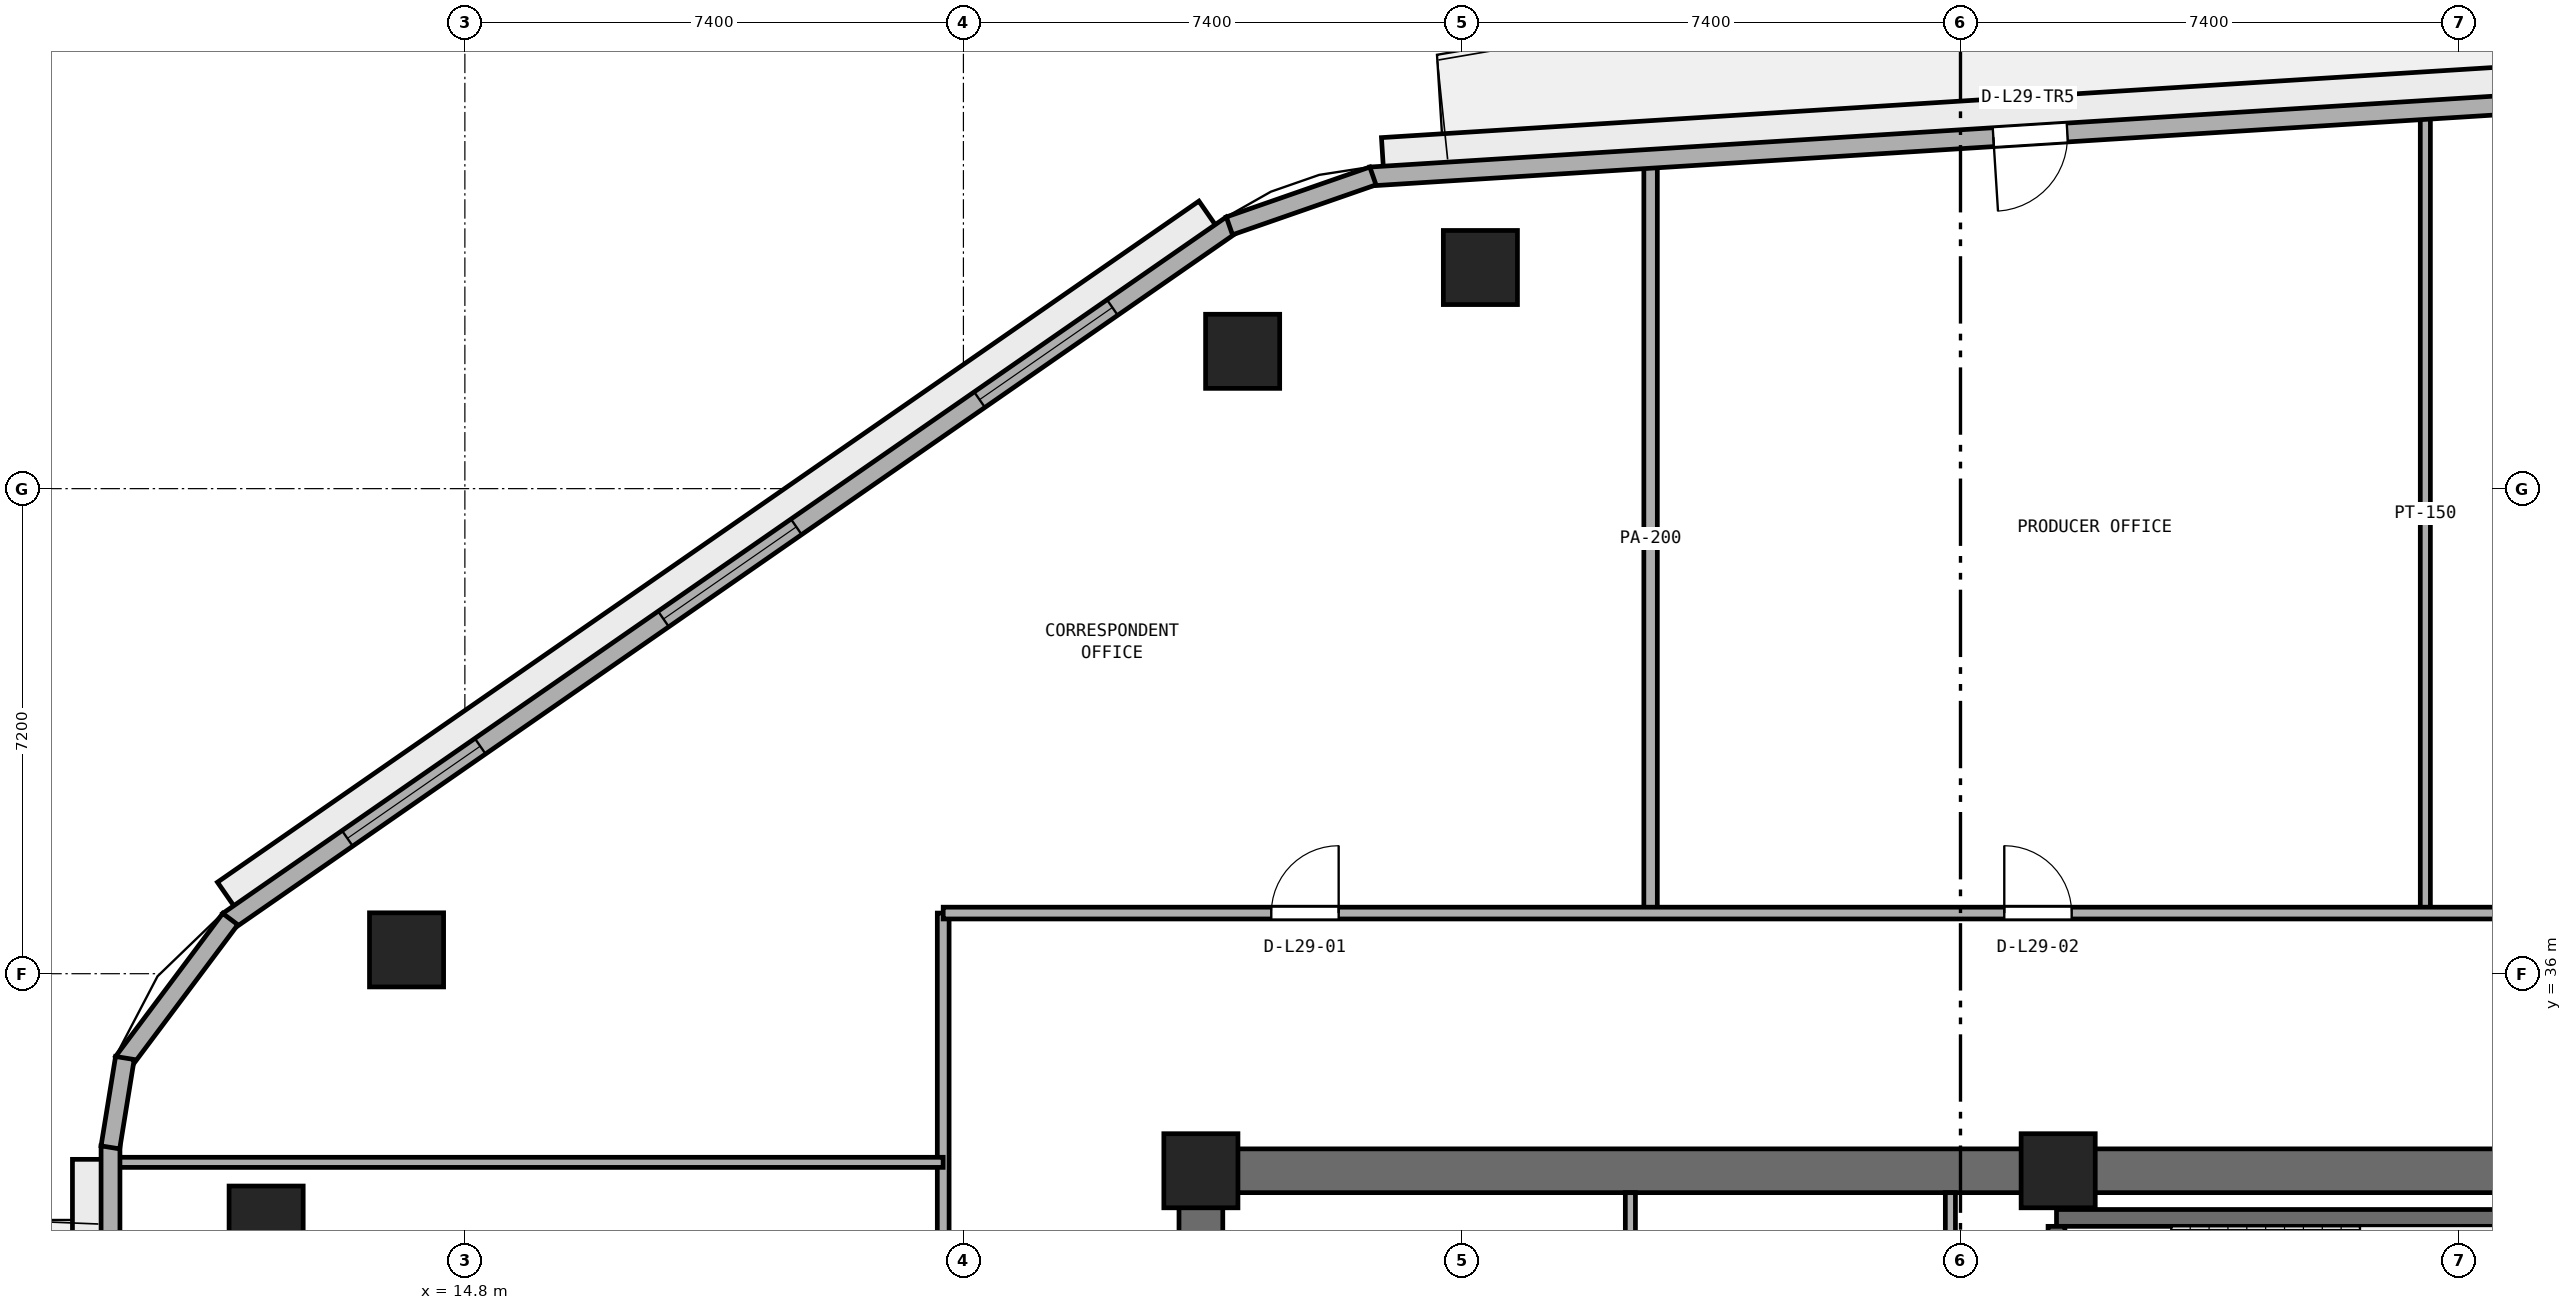
"""IFC4 building model, lengths in metres.
Left out: names, types, materials, properties, quantities, classifications, styles, units other than length and angle.
Written with IfcOpenShell. Run it as: python <this file> out.ifc"""

import sys

from ifc_helpers import new_model, si_unit, direction, frame, frame_2d, origin, origin_2d, place, context, subcontext, project, spatial, rectangle, extrude, element, fill, save


model = new_model("IFC4")
c1 = context("Model", 3, precision=1e-05, world=origin(), true_north=direction((0.0, 1.0)))
c2 = subcontext(c1, "Body", "Model", "MODEL_VIEW")
j1 = project(units=[si_unit("LENGTHUNIT", "METRE"), si_unit("PLANEANGLEUNIT", "RADIAN")], contexts=[c1])
p1 = place(None, origin())
s1 = spatial("IfcSite", under=j1, at=p1, CompositionType="ELEMENT")
p2 = place(p1, origin())
s2 = spatial("IfcBuilding", under=s1, at=p2, CompositionType="ELEMENT")
p3 = place(p2, frame((0.0, 0.0, 116.2)))
s3 = spatial("IfcBuildingStorey", under=s2, at=p3, CompositionType="ELEMENT", Elevation=116.2)
p4 = place(p3, frame((25.4, 33.075, 0.0), z_axis=(0.0, 0.0, 1.0), x_axis=(1.0, 0.0, 0.0)))
e1 = element("IfcWall", 1, at=p4, inside=s3, PredefinedType="SHEAR", context=c2, shape_type="SweptSolid", body=[
    extrude(rectangle(XDim=23.2, YDim=0.65, at=frame_2d((11.6, 0.0))), origin(), (0.0, 0.0, 1.0), 3.4),
])
p5 = place(p3, frame((25.725, 17.65, 0.0), z_axis=(0.0, 0.0, 1.0), x_axis=(0.0, 1.0, 0.0)))
e2 = element("IfcWall", 2, at=p5, inside=s3, PredefinedType="SHEAR", context=c2, shape_type="SweptSolid", body=[
    extrude(rectangle(XDim=15.1, YDim=0.65, at=frame_2d((7.55, 0.0))), origin(), (0.0, 0.0, 1.0), 3.4),
])
p6 = place(p5, frame((6.8, 0.0, 0.0)))
e3 = element("IfcOpeningElement", 3, at=p6, cuts=e2, PredefinedType="OPENING", context=c2, shape_type="SweptSolid", body=[
    extrude(rectangle(XDim=1.5, YDim=2.15, at=frame_2d((0.75, 1.075))), frame((0.0, 0.335, 0.0), z_axis=(0.0, -1.0, 0.0), x_axis=(1.0, 0.0, 0.0)), (0.0, 0.0, 1.0), 0.67),
])
for number, where, z_axis, x_axis in (
    (4, (38.45, 33.075, 0.0), (0.0, 0.0, 1.0), (1.0, 0.0, 0.0)),
    (5, (25.725, 33.075, 0.0), (0.0, 0.0, 1.0), (1.0, 0.0, 0.0)),
):
    element("IfcColumn", number, at=place(p3, frame(where, z_axis=z_axis, x_axis=x_axis)), inside=s3, PredefinedType="PILASTER", context=c2, shape_type="SweptSolid", body=[
        extrude(rectangle(XDim=1.1, YDim=1.1, at=origin_2d()), origin(), (0.0, 0.0, 1.0), 3.8),
    ])
for number, where, z_axis, x_axis in (
    (6, (29.874, 46.482, 0.0), (0.0, 0.0, 1.0), (1.0, 0.0, 0.0)),
    (7, (26.344, 45.238, 0.0), (0.0, 0.0, 1.0), (1.0, 0.0, 0.0)),
    (8, (13.934, 36.354, 0.0), (0.0, 0.0, 1.0), (1.0, 0.0, 0.0)),
    (9, (11.85, 32.298, 0.0), (0.0, 0.0, 1.0), (1.0, 0.0, 0.0)),
):
    element("IfcColumn", number, at=place(p3, frame(where, z_axis=z_axis, x_axis=x_axis)), inside=s3, PredefinedType="COLUMN", context=c2, shape_type="SweptSolid", body=[
        extrude(rectangle(XDim=1.1, YDim=1.1, at=origin_2d()), origin(), (0.0, 0.0, 1.0), 3.8),
    ])
p7 = place(p3, frame((38.425, 32.375, 0.0), z_axis=(0.0, 0.0, 1.0), x_axis=(1.0, 0.0, 0.0)))
e10 = element("IfcWall", 10, at=p7, inside=s3, PredefinedType="SHEAR", context=c2, shape_type="SweptSolid", body=[
    extrude(rectangle(XDim=7.3, YDim=0.25, at=frame_2d((3.65, 0.0))), origin(), (0.0, 0.0, 1.0), 3.4),
])
p8 = place(p3, frame((38.425, 29.05, 0.0), z_axis=(0.0, 0.0, 1.0), x_axis=(0.0, 1.0, 0.0)))
e11 = element("IfcWall", 11, at=p8, inside=s3, PredefinedType="SHEAR", context=c2, shape_type="SweptSolid", body=[
    extrude(rectangle(XDim=3.2, YDim=0.25, at=frame_2d((1.6, 0.0))), origin(), (0.0, 0.0, 1.0), 3.4),
])
p9 = place(p8, frame((0.35, 0.0, 0.0)))
e12 = element("IfcOpeningElement", 12, at=p9, cuts=e11, PredefinedType="OPENING", context=c2, shape_type="SweptSolid", body=[
    extrude(rectangle(XDim=1.1, YDim=2.15, at=frame_2d((0.55, 1.075))), frame((0.0, 0.135, 0.0), z_axis=(0.0, -1.0, 0.0), x_axis=(1.0, 0.0, 0.0)), (0.0, 0.0, 1.0), 0.27),
])
for number, where, z_axis, x_axis in (
    (13, (32.1, 30.65, 0.0), (0.0, 0.0, 1.0), (0.0, 1.0, 0.0)),
    (14, (36.85, 30.65, 0.0), (0.0, 0.0, 1.0), (0.0, 1.0, 0.0)),
):
    element("IfcWall", number, at=place(p3, frame(where, z_axis=z_axis, x_axis=x_axis)), inside=s3, PredefinedType="PARTITIONING", context=c2, shape_type="SweptSolid", body=[
        extrude(rectangle(XDim=2.1, YDim=0.15, at=frame_2d((1.05, 0.0))), origin(), (0.0, 0.0, 1.0), 3.4),
    ])
p10 = place(p3, frame((43.9, 36.9, 0.0), z_axis=(0.0, 0.0, 1.0), x_axis=(0.0, 1.0, 0.0)))
e15 = element("IfcWall", 15, at=p10, inside=s3, PredefinedType="PARTITIONING", context=c2, shape_type="SweptSolid", body=[
    extrude(rectangle(XDim=11.857, YDim=0.15, at=frame_2d((5.928, 0.0))), origin(), (0.0, 0.0, 1.0), 3.4),
])
p11 = place(p3, frame((32.4, 36.901, 0.0), z_axis=(0.0, 0.0, 1.0), x_axis=(0.0, 1.0, 0.0)))
e16 = element("IfcWall", 16, at=p11, inside=s3, PredefinedType="PARTITIONING", context=c2, shape_type="SweptSolid", body=[
    extrude(rectangle(XDim=11.131, YDim=0.2, at=frame_2d((5.565, 0.0))), origin(), (0.0, 0.0, 1.0), 3.4),
])
p12 = place(p3, frame((21.9, 5.958, 0.0), z_axis=(0.0, 0.0, 1.0), x_axis=(0.0, 1.0, 0.0)))
e17 = element("IfcWall", 17, at=p12, inside=s3, PredefinedType="PARTITIONING", context=c2, shape_type="SweptSolid", body=[
    extrude(rectangle(XDim=30.942, YDim=0.175, at=frame_2d((15.471, 0.0))), origin(), (0.0, 0.0, 1.0), 3.4),
])
p13 = place(p12, frame((10.292, 0.0, 0.0)))
e18 = element("IfcOpeningElement", 18, at=p13, cuts=e17, PredefinedType="OPENING", context=c2, shape_type="SweptSolid", body=[
    extrude(rectangle(XDim=1.0, YDim=2.12, at=frame_2d((0.5, 1.06))), frame((0.0, 0.097, 0.0), z_axis=(0.0, -1.0, 0.0), x_axis=(1.0, 0.0, 0.0)), (0.0, 0.0, 1.0), 0.195),
])
p14 = place(p12, frame((16.842, 0.0, 0.0)))
e19 = element("IfcOpeningElement", 19, at=p14, cuts=e17, PredefinedType="OPENING", context=c2, shape_type="SweptSolid", body=[
    extrude(rectangle(XDim=1.0, YDim=2.12, at=frame_2d((0.5, 1.06))), frame((0.0, 0.097, 0.0), z_axis=(0.0, -1.0, 0.0), x_axis=(1.0, 0.0, 0.0)), (0.0, 0.0, 1.0), 0.195),
])
p15 = place(p12, frame((23.492, 0.0, 0.0)))
e20 = element("IfcOpeningElement", 20, at=p15, cuts=e17, PredefinedType="OPENING", context=c2, shape_type="SweptSolid", body=[
    extrude(rectangle(XDim=0.9, YDim=2.1, at=frame_2d((0.45, 1.05))), frame((0.0, 0.097, 0.0), z_axis=(0.0, -1.0, 0.0), x_axis=(1.0, 0.0, 0.0)), (0.0, 0.0, 1.0), 0.195),
])
p16 = place(p3, frame((9.605, 33.2, 0.0), z_axis=(0.0, 0.0, 1.0), x_axis=(1.0, 0.0, 0.0)))
e21 = element("IfcWall", 21, at=p16, inside=s3, PredefinedType="PARTITIONING", context=c2, shape_type="SweptSolid", body=[
    extrude(rectangle(XDim=12.294, YDim=0.15, at=frame_2d((6.147, 0.0))), origin(), (0.0, 0.0, 1.0), 3.4),
])
p17 = place(p3, frame((21.9, 36.9, 0.0), z_axis=(0.0, 0.0, 1.0), x_axis=(1.0, 0.0, 0.0)))
e22 = element("IfcWall", 22, at=p17, inside=s3, PredefinedType="PARTITIONING", context=c2, shape_type="SweptSolid", body=[
    extrude(rectangle(XDim=30.2, YDim=0.175, at=frame_2d((15.1, 0.0))), origin(), (0.0, 0.0, 1.0), 3.4),
])
p18 = place(p17, frame((4.87, 0.0, 0.0)))
e23 = element("IfcOpeningElement", 23, at=p18, cuts=e22, PredefinedType="OPENING", context=c2, shape_type="SweptSolid", body=[
    extrude(rectangle(XDim=1.0, YDim=2.12, at=frame_2d((0.5, 1.06))), frame((0.0, 0.097, 0.0), z_axis=(0.0, -1.0, 0.0), x_axis=(1.0, 0.0, 0.0)), (0.0, 0.0, 1.0), 0.195),
])
p19 = place(p17, frame((15.75, 0.0, 0.0)))
e24 = element("IfcOpeningElement", 24, at=p19, cuts=e22, PredefinedType="OPENING", context=c2, shape_type="SweptSolid", body=[
    extrude(rectangle(XDim=1.0, YDim=2.12, at=frame_2d((0.5, 1.06))), frame((0.0, 0.097, 0.0), z_axis=(0.0, -1.0, 0.0), x_axis=(1.0, 0.0, 0.0)), (0.0, 0.0, 1.0), 0.195),
])
p20 = place(p17, frame((25.48, 0.0, 0.0)))
e25 = element("IfcOpeningElement", 25, at=p20, cuts=e22, PredefinedType="OPENING", context=c2, shape_type="SweptSolid", body=[
    extrude(rectangle(XDim=1.0, YDim=2.12, at=frame_2d((0.5, 1.06))), frame((0.0, 0.097, 0.0), z_axis=(0.0, -1.0, 0.0), x_axis=(1.0, 0.0, 0.0)), (0.0, 0.0, 1.0), 0.195),
])
p21 = place(p3, frame((47.832, 49.069, 0.0), z_axis=(0.0, 0.0, 1.0), x_axis=(-0.998017725054, -0.062933460723, 0.0)))
e26 = element("IfcWall", 26, at=p21, inside=s3, PredefinedType="STANDARD", context=c2, shape_type="SweptSolid", body=[
    extrude(rectangle(XDim=19.629, YDim=0.28, at=frame_2d((9.815, 0.0))), origin(), (0.0, 0.0, 1.0), 3.4),
])
p22 = place(p21, frame((9.265, 0.0, 0.0)))
e27 = element("IfcOpeningElement", 27, at=p22, cuts=e26, PredefinedType="OPENING", context=c2, shape_type="SweptSolid", body=[
    extrude(rectangle(XDim=1.1, YDim=2.2, at=frame_2d((0.55, 1.1))), frame((0.0, 0.15, 0.0), z_axis=(0.0, -1.0, 0.0), x_axis=(1.0, 0.0, 0.0)), (0.0, 0.0, 1.0), 0.3),
])
p23 = place(p3, frame((26.182, 47.118, 0.0), z_axis=(0.0, 0.0, 1.0), x_axis=(-0.821547956627, -0.570139417127, 0.0)))
e28 = element("IfcWall", 28, at=p23, inside=s3, PredefinedType="STANDARD", context=c2, shape_type="SweptSolid", body=[
    extrude(rectangle(XDim=18.132, YDim=0.28, at=frame_2d((9.066, 0.0))), origin(), (0.0, 0.0, 1.0), 3.4),
])
p24 = place(p23, frame((2.156, 0.0, 0.9)))
e29 = element("IfcOpeningElement", 29, at=p24, cuts=e28, PredefinedType="OPENING", context=c2, shape_type="SweptSolid", body=[
    extrude(rectangle(XDim=2.4, YDim=1.75, at=frame_2d((1.2, 0.875))), frame((0.0, 0.15, 0.0), z_axis=(0.0, -1.0, 0.0), x_axis=(1.0, 0.0, 0.0)), (0.0, 0.0, 1.0), 0.3),
])
p25 = place(p23, frame((7.866, 0.0, 0.9)))
e30 = element("IfcOpeningElement", 30, at=p25, cuts=e28, PredefinedType="OPENING", context=c2, shape_type="SweptSolid", body=[
    extrude(rectangle(XDim=2.4, YDim=1.75, at=frame_2d((1.2, 0.875))), frame((0.0, 0.15, 0.0), z_axis=(0.0, -1.0, 0.0), x_axis=(1.0, 0.0, 0.0)), (0.0, 0.0, 1.0), 0.3),
])
p26 = place(p23, frame((13.577, 0.0, 0.9)))
e31 = element("IfcOpeningElement", 31, at=p26, cuts=e28, PredefinedType="OPENING", context=c2, shape_type="SweptSolid", body=[
    extrude(rectangle(XDim=2.4, YDim=1.75, at=frame_2d((1.2, 0.875))), frame((0.0, 0.15, 0.0), z_axis=(0.0, -1.0, 0.0), x_axis=(1.0, 0.0, 0.0)), (0.0, 0.0, 1.0), 0.3),
])
p27 = place(p3, frame((9.54, 33.444, 0.0), z_axis=(0.0, 0.0, 1.0), x_axis=(0.0, -1.0, 0.0)))
e32 = element("IfcWall", 32, at=p27, inside=s3, PredefinedType="STANDARD", context=c2, shape_type="SweptSolid", body=[
    extrude(rectangle(XDim=17.301, YDim=0.28, at=frame_2d((8.65, 0.0))), origin(), (0.0, 0.0, 1.0), 3.4),
])
p28 = place(p27, frame((8.1, 0.0, 0.0)))
e33 = element("IfcOpeningElement", 33, at=p28, cuts=e32, PredefinedType="OPENING", context=c2, shape_type="SweptSolid", body=[
    extrude(rectangle(XDim=1.1, YDim=2.2, at=frame_2d((0.55, 1.1))), frame((0.0, 0.15, 0.0), z_axis=(0.0, -1.0, 0.0), x_axis=(1.0, 0.0, 0.0)), (0.0, 0.0, 1.0), 0.3),
])
p29 = place(p27, frame((2.017, 0.0, 0.9)))
e34 = element("IfcOpeningElement", 34, at=p29, cuts=e32, PredefinedType="OPENING", context=c2, shape_type="SweptSolid", body=[
    extrude(rectangle(XDim=2.4, YDim=1.75, at=frame_2d((1.2, 0.875))), frame((0.0, 0.15, 0.0), z_axis=(0.0, -1.0, 0.0), x_axis=(1.0, 0.0, 0.0)), (0.0, 0.0, 1.0), 0.3),
])
p30 = place(p3, frame((28.278, 47.842, 0.0), z_axis=(0.0, 0.0, 1.0), x_axis=(-0.9444559001, -0.328638179106, 0.0)))
e35 = element("IfcWall", 35, at=p30, inside=s3, PredefinedType="STANDARD", context=c2, shape_type="SweptSolid", body=[
    extrude(rectangle(XDim=2.255, YDim=0.28, at=frame_2d((1.128, 0.0))), origin(), (0.0, 0.0, 1.0), 3.4),
])
p31 = place(p3, frame((11.318, 36.811, 0.0), z_axis=(0.0, 0.0, 1.0), x_axis=(-0.599455152629, -0.800408345775, 0.0)))
e36 = element("IfcWall", 36, at=p31, inside=s3, PredefinedType="STANDARD", context=c2, shape_type="SweptSolid", body=[
    extrude(rectangle(XDim=2.653, YDim=0.28, at=frame_2d((1.327, 0.0))), origin(), (0.0, 0.0, 1.0), 3.4),
])
p32 = place(p3, frame((9.753, 34.749, 0.0), z_axis=(0.0, 0.0, 1.0), x_axis=(-0.160037671962, -0.987110907423, 0.0)))
e37 = element("IfcWall", 37, at=p32, inside=s3, PredefinedType="STANDARD", context=c2, shape_type="SweptSolid", body=[
    extrude(rectangle(XDim=1.344, YDim=0.28, at=frame_2d((0.672, 0.0))), origin(), (0.0, 0.0, 1.0), 3.4),
])
p33 = place(p18, origin())
e38 = element("IfcDoor", 38, at=p33, inside=s3, OperationType="SINGLE_SWING_RIGHT", PredefinedType="DOOR", context=c2, shape_type="SweptSolid", body=[
    extrude(rectangle(XDim=1.0, YDim=2.12, at=frame_2d((0.5, 1.06))), frame((0.0, 0.025, 0.0), z_axis=(0.0, -1.0, 0.0), x_axis=(1.0, 0.0, 0.0)), (0.0, 0.0, 1.0), 0.05),
])
fill(e23, e38)
p34 = place(p19, origin())
e39 = element("IfcDoor", 39, at=p34, inside=s3, OperationType="SINGLE_SWING_LEFT", PredefinedType="DOOR", context=c2, shape_type="SweptSolid", body=[
    extrude(rectangle(XDim=1.0, YDim=2.12, at=frame_2d((0.5, 1.06))), frame((0.0, 0.025, 0.0), z_axis=(0.0, -1.0, 0.0), x_axis=(1.0, 0.0, 0.0)), (0.0, 0.0, 1.0), 0.05),
])
fill(e24, e39)
p35 = place(p22, origin())
e40 = element("IfcDoor", 40, at=p35, inside=s3, OperationType="SINGLE_SWING_RIGHT", PredefinedType="DOOR", context=c2, shape_type="SweptSolid", body=[
    extrude(rectangle(XDim=1.1, YDim=2.2, at=frame_2d((0.55, 1.1))), frame((0.0, 0.025, 0.0), z_axis=(0.0, -1.0, 0.0), x_axis=(1.0, 0.0, 0.0)), (0.0, 0.0, 1.0), 0.05),
])
fill(e27, e40)
p36 = place(p24, origin())
e41 = element("IfcWindow", 41, at=p36, inside=s3, PartitioningType="SINGLE_PANEL", PredefinedType="WINDOW", context=c2, shape_type="SweptSolid", body=[
    extrude(rectangle(XDim=2.4, YDim=1.75, at=frame_2d((1.2, 0.875))), frame((0.0, 0.03, 0.0), z_axis=(0.0, -1.0, 0.0), x_axis=(1.0, 0.0, 0.0)), (0.0, 0.0, 1.0), 0.06),
])
fill(e29, e41)
p37 = place(p25, origin())
e42 = element("IfcWindow", 42, at=p37, inside=s3, PartitioningType="SINGLE_PANEL", PredefinedType="WINDOW", context=c2, shape_type="SweptSolid", body=[
    extrude(rectangle(XDim=2.4, YDim=1.75, at=frame_2d((1.2, 0.875))), frame((0.0, 0.03, 0.0), z_axis=(0.0, -1.0, 0.0), x_axis=(1.0, 0.0, 0.0)), (0.0, 0.0, 1.0), 0.06),
])
fill(e30, e42)
p38 = place(p26, origin())
e43 = element("IfcWindow", 43, at=p38, inside=s3, PartitioningType="SINGLE_PANEL", PredefinedType="WINDOW", context=c2, shape_type="SweptSolid", body=[
    extrude(rectangle(XDim=2.4, YDim=1.75, at=frame_2d((1.2, 0.875))), frame((0.0, 0.03, 0.0), z_axis=(0.0, -1.0, 0.0), x_axis=(1.0, 0.0, 0.0)), (0.0, 0.0, 1.0), 0.06),
])
fill(e31, e43)
save(model, sys.argv[1])
